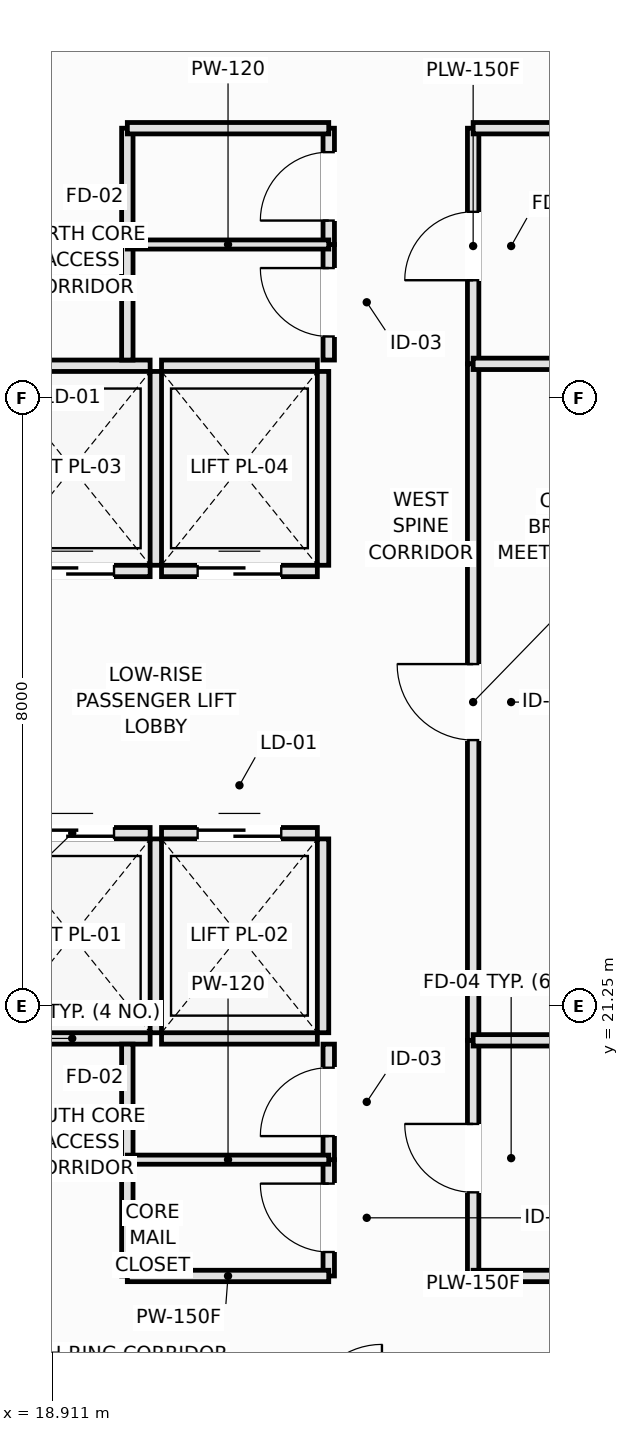
"""IFC4 building model, lengths in metres.
Left out: names, types, materials, properties, quantities, classifications, styles, units other than length and angle.
Written with IfcOpenShell. Run it as: python <this file> out.ifc"""

import sys

from ifc_helpers import new_model, si_unit, direction, frame, frame_2d, origin, place, context, subcontext, project, spatial, rectangle, extrude, element, fill, save


model = new_model("IFC4")
c1 = context("Model", 3, precision=1e-05, world=origin(), true_north=direction((0.0, 1.0)))
c2 = subcontext(c1, "Body", "Model", "MODEL_VIEW")
j1 = project(units=[si_unit("LENGTHUNIT", "METRE"), si_unit("PLANEANGLEUNIT", "RADIAN")], contexts=[c1])
p1 = place(None, origin())
s1 = spatial("IfcSite", under=j1, at=p1, CompositionType="ELEMENT")
p2 = place(p1, origin())
s2 = spatial("IfcBuilding", under=s1, at=p2, CompositionType="ELEMENT")
p3 = place(p2, frame((0.0, 0.0, 68.2)))
s3 = spatial("IfcBuildingStorey", under=s2, at=p3, CompositionType="ELEMENT", Elevation=68.2)
p4 = place(p3, frame((18.15, 20.825, 0.0), z_axis=(0.0, 0.0, 1.0), x_axis=(1.0, 0.0, 0.0)))
e1 = element("IfcWall", 1, at=p4, inside=s3, PredefinedType="PARTITIONING", context=c2, shape_type="SweptSolid", body=[
    extrude(rectangle(XDim=2.05, YDim=0.15, at=frame_2d((1.025, 0.0))), origin(), (0.0, 0.0, 1.0), 3.37),
])
p5 = place(p3, frame((18.15, 23.525, 0.0), z_axis=(0.0, 0.0, 1.0), x_axis=(1.0, 0.0, 0.0)))
e2 = element("IfcWall", 2, at=p5, inside=s3, PredefinedType="PARTITIONING", context=c2, shape_type="SweptSolid", body=[
    extrude(rectangle(XDim=2.05, YDim=0.15, at=frame_2d((1.025, 0.0))), origin(), (0.0, 0.0, 1.0), 3.37),
])
p6 = place(p5, frame((0.475, 0.0, 0.0)))
e3 = element("IfcOpeningElement", 3, at=p6, cuts=e2, PredefinedType="OPENING", context=c2, shape_type="SweptSolid", body=[
    extrude(rectangle(XDim=1.1, YDim=2.2, at=frame_2d((0.55, 1.1))), frame((0.0, 0.085, 0.0), z_axis=(0.0, -1.0, 0.0), x_axis=(1.0, 0.0, 0.0)), (0.0, 0.0, 1.0), 0.17),
])
p7 = place(p3, frame((20.275, 20.9, 0.0), z_axis=(0.0, 0.0, 1.0), x_axis=(0.0, 1.0, 0.0)))
e4 = element("IfcWall", 4, at=p7, inside=s3, PredefinedType="PARTITIONING", context=c2, shape_type="SweptSolid", body=[
    extrude(rectangle(XDim=2.55, YDim=0.15, at=frame_2d((1.275, 0.0))), origin(), (0.0, 0.0, 1.0), 3.37),
])
p8 = place(p3, frame((20.35, 20.825, 0.0), z_axis=(0.0, 0.0, 1.0), x_axis=(1.0, 0.0, 0.0)))
e5 = element("IfcWall", 5, at=p8, inside=s3, PredefinedType="PARTITIONING", context=c2, shape_type="SweptSolid", body=[
    extrude(rectangle(XDim=2.05, YDim=0.15, at=frame_2d((1.025, 0.0))), origin(), (0.0, 0.0, 1.0), 3.37),
])
p9 = place(p3, frame((20.35, 23.525, 0.0), z_axis=(0.0, 0.0, 1.0), x_axis=(1.0, 0.0, 0.0)))
e6 = element("IfcWall", 6, at=p9, inside=s3, PredefinedType="PARTITIONING", context=c2, shape_type="SweptSolid", body=[
    extrude(rectangle(XDim=2.05, YDim=0.15, at=frame_2d((1.025, 0.0))), origin(), (0.0, 0.0, 1.0), 3.37),
])
p10 = place(p9, frame((0.475, 0.0, 0.0)))
e7 = element("IfcOpeningElement", 7, at=p10, cuts=e6, PredefinedType="OPENING", context=c2, shape_type="SweptSolid", body=[
    extrude(rectangle(XDim=1.1, YDim=2.2, at=frame_2d((0.55, 1.1))), frame((0.0, 0.085, 0.0), z_axis=(0.0, -1.0, 0.0), x_axis=(1.0, 0.0, 0.0)), (0.0, 0.0, 1.0), 0.17),
])
p11 = place(p3, frame((22.475, 20.9, 0.0), z_axis=(0.0, 0.0, 1.0), x_axis=(0.0, 1.0, 0.0)))
e8 = element("IfcWall", 8, at=p11, inside=s3, PredefinedType="PARTITIONING", context=c2, shape_type="SweptSolid", body=[
    extrude(rectangle(XDim=2.55, YDim=0.15, at=frame_2d((1.275, 0.0))), origin(), (0.0, 0.0, 1.0), 3.37),
])
p12 = place(p3, frame((18.15, 26.975, 0.0), z_axis=(0.0, 0.0, 1.0), x_axis=(1.0, 0.0, 0.0)))
e9 = element("IfcWall", 9, at=p12, inside=s3, PredefinedType="PARTITIONING", context=c2, shape_type="SweptSolid", body=[
    extrude(rectangle(XDim=2.05, YDim=0.15, at=frame_2d((1.025, 0.0))), origin(), (0.0, 0.0, 1.0), 3.37),
])
p13 = place(p12, frame((0.475, 0.0, 0.0)))
e10 = element("IfcOpeningElement", 10, at=p13, cuts=e9, PredefinedType="OPENING", context=c2, shape_type="SweptSolid", body=[
    extrude(rectangle(XDim=1.1, YDim=2.2, at=frame_2d((0.55, 1.1))), frame((0.0, 0.085, 0.0), z_axis=(0.0, -1.0, 0.0), x_axis=(1.0, 0.0, 0.0)), (0.0, 0.0, 1.0), 0.17),
])
p14 = place(p3, frame((18.15, 29.675, 0.0), z_axis=(0.0, 0.0, 1.0), x_axis=(1.0, 0.0, 0.0)))
e11 = element("IfcWall", 11, at=p14, inside=s3, PredefinedType="PARTITIONING", context=c2, shape_type="SweptSolid", body=[
    extrude(rectangle(XDim=2.05, YDim=0.15, at=frame_2d((1.025, 0.0))), origin(), (0.0, 0.0, 1.0), 3.37),
])
p15 = place(p3, frame((20.275, 27.05, 0.0), z_axis=(0.0, 0.0, 1.0), x_axis=(0.0, 1.0, 0.0)))
e12 = element("IfcWall", 12, at=p15, inside=s3, PredefinedType="PARTITIONING", context=c2, shape_type="SweptSolid", body=[
    extrude(rectangle(XDim=2.55, YDim=0.15, at=frame_2d((1.275, 0.0))), origin(), (0.0, 0.0, 1.0), 3.37),
])
p16 = place(p3, frame((20.35, 26.975, 0.0), z_axis=(0.0, 0.0, 1.0), x_axis=(1.0, 0.0, 0.0)))
e13 = element("IfcWall", 13, at=p16, inside=s3, PredefinedType="PARTITIONING", context=c2, shape_type="SweptSolid", body=[
    extrude(rectangle(XDim=2.05, YDim=0.15, at=frame_2d((1.025, 0.0))), origin(), (0.0, 0.0, 1.0), 3.37),
])
p17 = place(p16, frame((0.475, 0.0, 0.0)))
e14 = element("IfcOpeningElement", 14, at=p17, cuts=e13, PredefinedType="OPENING", context=c2, shape_type="SweptSolid", body=[
    extrude(rectangle(XDim=1.1, YDim=2.2, at=frame_2d((0.55, 1.1))), frame((0.0, 0.085, 0.0), z_axis=(0.0, -1.0, 0.0), x_axis=(1.0, 0.0, 0.0)), (0.0, 0.0, 1.0), 0.17),
])
p18 = place(p3, frame((20.35, 29.675, 0.0), z_axis=(0.0, 0.0, 1.0), x_axis=(1.0, 0.0, 0.0)))
e15 = element("IfcWall", 15, at=p18, inside=s3, PredefinedType="PARTITIONING", context=c2, shape_type="SweptSolid", body=[
    extrude(rectangle(XDim=2.05, YDim=0.15, at=frame_2d((1.025, 0.0))), origin(), (0.0, 0.0, 1.0), 3.37),
])
p19 = place(p3, frame((22.475, 27.05, 0.0), z_axis=(0.0, 0.0, 1.0), x_axis=(0.0, 1.0, 0.0)))
e16 = element("IfcWall", 16, at=p19, inside=s3, PredefinedType="PARTITIONING", context=c2, shape_type="SweptSolid", body=[
    extrude(rectangle(XDim=2.55, YDim=0.15, at=frame_2d((1.275, 0.0))), origin(), (0.0, 0.0, 1.0), 3.37),
])
p20 = place(p3, frame((22.55, 17.7, 0.0), z_axis=(0.0, 0.0, 1.0), x_axis=(0.0, 1.0, 0.0)))
e17 = element("IfcWall", 17, at=p20, inside=s3, PredefinedType="PARTITIONING", context=c2, shape_type="SweptSolid", body=[
    extrude(rectangle(XDim=1.53, YDim=0.15, at=frame_2d((0.765, 0.0))), origin(), (0.0, 0.0, 1.0), 3.01),
])
p21 = place(p20, frame((0.315, 0.0, 0.0)))
e18 = element("IfcOpeningElement", 18, at=p21, cuts=e17, PredefinedType="OPENING", context=c2, shape_type="SweptSolid", body=[
    extrude(rectangle(XDim=0.9, YDim=2.1, at=frame_2d((0.45, 1.05))), frame((0.0, 0.085, 0.0), z_axis=(0.0, -1.0, 0.0), x_axis=(1.0, 0.0, 0.0)), (0.0, 0.0, 1.0), 0.17),
])
p22 = place(p3, frame((22.55, 19.23, 0.0), z_axis=(0.0, 0.0, 1.0), x_axis=(0.0, 1.0, 0.0)))
e19 = element("IfcWall", 19, at=p22, inside=s3, PredefinedType="PARTITIONING", context=c2, shape_type="SweptSolid", body=[
    extrude(rectangle(XDim=1.52, YDim=0.15, at=frame_2d((0.76, 0.0))), origin(), (0.0, 0.0, 1.0), 3.01),
])
p23 = place(p22, frame((0.31, 0.0, 0.0)))
e20 = element("IfcOpeningElement", 20, at=p23, cuts=e19, PredefinedType="OPENING", context=c2, shape_type="SweptSolid", body=[
    extrude(rectangle(XDim=0.9, YDim=2.1, at=frame_2d((0.45, 1.05))), frame((0.0, 0.085, 0.0), z_axis=(0.0, -1.0, 0.0), x_axis=(1.0, 0.0, 0.0)), (0.0, 0.0, 1.0), 0.17),
])
p24 = place(p3, frame((22.55, 29.75, 0.0), z_axis=(0.0, 0.0, 1.0), x_axis=(0.0, 1.0, 0.0)))
e21 = element("IfcWall", 21, at=p24, inside=s3, PredefinedType="PARTITIONING", context=c2, shape_type="SweptSolid", body=[
    extrude(rectangle(XDim=1.52, YDim=0.15, at=frame_2d((0.76, 0.0))), origin(), (0.0, 0.0, 1.0), 3.01),
])
p25 = place(p24, frame((0.31, 0.0, 0.0)))
e22 = element("IfcOpeningElement", 22, at=p25, cuts=e21, PredefinedType="OPENING", context=c2, shape_type="SweptSolid", body=[
    extrude(rectangle(XDim=0.9, YDim=2.1, at=frame_2d((0.45, 1.05))), frame((0.0, 0.085, 0.0), z_axis=(0.0, -1.0, 0.0), x_axis=(1.0, 0.0, 0.0)), (0.0, 0.0, 1.0), 0.17),
])
p26 = place(p3, frame((22.55, 31.27, 0.0), z_axis=(0.0, 0.0, 1.0), x_axis=(0.0, 1.0, 0.0)))
e23 = element("IfcWall", 23, at=p26, inside=s3, PredefinedType="PARTITIONING", context=c2, shape_type="SweptSolid", body=[
    extrude(rectangle(XDim=1.53, YDim=0.15, at=frame_2d((0.765, 0.0))), origin(), (0.0, 0.0, 1.0), 3.01),
])
p27 = place(p26, frame((0.315, 0.0, 0.0)))
e24 = element("IfcOpeningElement", 24, at=p27, cuts=e23, PredefinedType="OPENING", context=c2, shape_type="SweptSolid", body=[
    extrude(rectangle(XDim=0.9, YDim=2.1, at=frame_2d((0.45, 1.05))), frame((0.0, 0.085, 0.0), z_axis=(0.0, -1.0, 0.0), x_axis=(1.0, 0.0, 0.0)), (0.0, 0.0, 1.0), 0.17),
])
p28 = place(p3, frame((24.45, 17.7, 0.0), z_axis=(0.0, 0.0, 1.0), x_axis=(0.0, 1.0, 0.0)))
e25 = element("IfcWall", 25, at=p28, inside=s3, PredefinedType="PLUMBINGWALL", context=c2, shape_type="SweptSolid", body=[
    extrude(rectangle(XDim=3.1, YDim=0.15, at=frame_2d((1.55, 0.0))), origin(), (0.0, 0.0, 1.0), 3.37),
])
p29 = place(p28, frame((1.1, 0.0, 0.0)))
e26 = element("IfcOpeningElement", 26, at=p29, cuts=e25, PredefinedType="OPENING", context=c2, shape_type="SweptSolid", body=[
    extrude(rectangle(XDim=0.9, YDim=2.1, at=frame_2d((0.45, 1.05))), frame((0.0, 0.085, 0.0), z_axis=(0.0, -1.0, 0.0), x_axis=(1.0, 0.0, 0.0)), (0.0, 0.0, 1.0), 0.17),
])
p30 = place(p3, frame((24.45, 29.7, 0.0), z_axis=(0.0, 0.0, 1.0), x_axis=(0.0, 1.0, 0.0)))
e27 = element("IfcWall", 27, at=p30, inside=s3, PredefinedType="PLUMBINGWALL", context=c2, shape_type="SweptSolid", body=[
    extrude(rectangle(XDim=3.1, YDim=0.15, at=frame_2d((1.55, 0.0))), origin(), (0.0, 0.0, 1.0), 3.37),
])
p31 = place(p30, frame((1.1, 0.0, 0.0)))
e28 = element("IfcOpeningElement", 28, at=p31, cuts=e27, PredefinedType="OPENING", context=c2, shape_type="SweptSolid", body=[
    extrude(rectangle(XDim=0.9, YDim=2.1, at=frame_2d((0.45, 1.05))), frame((0.0, 0.085, 0.0), z_axis=(0.0, -1.0, 0.0), x_axis=(1.0, 0.0, 0.0)), (0.0, 0.0, 1.0), 0.17),
])
p32 = place(p3, frame((24.45, 20.8, 0.0), z_axis=(0.0, 0.0, 1.0), x_axis=(0.0, 1.0, 0.0)))
e29 = element("IfcWall", 29, at=p32, inside=s3, PredefinedType="PARTITIONING", context=c2, shape_type="SweptSolid", body=[
    extrude(rectangle(XDim=8.9, YDim=0.15, at=frame_2d((4.45, 0.0))), origin(), (0.0, 0.0, 1.0), 3.37),
])
p33 = place(p32, frame((3.95, 0.0, 0.0)))
e30 = element("IfcOpeningElement", 30, at=p33, cuts=e29, PredefinedType="OPENING", context=c2, shape_type="SweptSolid", body=[
    extrude(rectangle(XDim=1.0, YDim=2.15, at=frame_2d((0.5, 1.075))), frame((0.0, 0.085, 0.0), z_axis=(0.0, -1.0, 0.0), x_axis=(1.0, 0.0, 0.0)), (0.0, 0.0, 1.0), 0.17),
])
p34 = place(p3, frame((19.9, 17.7, 0.0), z_axis=(0.0, 0.0, 1.0), x_axis=(0.0, 1.0, 0.0)))
e31 = element("IfcWall", 31, at=p34, inside=s3, PredefinedType="PARTITIONING", context=c2, shape_type="SweptSolid", body=[
    extrude(rectangle(XDim=1.53, YDim=0.15, at=frame_2d((0.765, 0.0))), origin(), (0.0, 0.0, 1.0), 3.37),
])
for number, where, z_axis, x_axis in (
    (32, (19.9, 19.23, 0.0), (0.0, 0.0, 1.0), (0.0, 1.0, 0.0)),
    (33, (19.9, 29.75, 0.0), (0.0, 0.0, 1.0), (0.0, 1.0, 0.0)),
):
    element("IfcWall", number, at=place(p3, frame(where, z_axis=z_axis, x_axis=x_axis)), inside=s3, PredefinedType="PARTITIONING", context=c2, shape_type="SweptSolid", body=[
        extrude(rectangle(XDim=1.52, YDim=0.15, at=frame_2d((0.76, 0.0))), origin(), (0.0, 0.0, 1.0), 3.37),
    ])
p35 = place(p3, frame((19.9, 31.27, 0.0), z_axis=(0.0, 0.0, 1.0), x_axis=(0.0, 1.0, 0.0)))
e34 = element("IfcWall", 34, at=p35, inside=s3, PredefinedType="PARTITIONING", context=c2, shape_type="SweptSolid", body=[
    extrude(rectangle(XDim=1.53, YDim=0.15, at=frame_2d((0.765, 0.0))), origin(), (0.0, 0.0, 1.0), 3.37),
])
p36 = place(p3, frame((19.9, 17.7, 0.0), z_axis=(0.0, 0.0, 1.0), x_axis=(1.0, 0.0, 0.0)))
e35 = element("IfcWall", 35, at=p36, inside=s3, PredefinedType="PARTITIONING", context=c2, shape_type="SweptSolid", body=[
    extrude(rectangle(XDim=2.65, YDim=0.15, at=frame_2d((1.325, 0.0))), origin(), (0.0, 0.0, 1.0), 3.37),
])
p37 = place(p3, frame((24.45, 17.7, 0.0), z_axis=(0.0, 0.0, 1.0), x_axis=(1.0, 0.0, 0.0)))
e36 = element("IfcWall", 36, at=p37, inside=s3, PredefinedType="PLUMBINGWALL", context=c2, shape_type="SweptSolid", body=[
    extrude(rectangle(XDim=3.15, YDim=0.15, at=frame_2d((1.575, 0.0))), origin(), (0.0, 0.0, 1.0), 3.37),
])
p38 = place(p3, frame((19.9, 32.8, 0.0), z_axis=(0.0, 0.0, 1.0), x_axis=(1.0, 0.0, 0.0)))
e37 = element("IfcWall", 37, at=p38, inside=s3, PredefinedType="PARTITIONING", context=c2, shape_type="SweptSolid", body=[
    extrude(rectangle(XDim=2.65, YDim=0.15, at=frame_2d((1.325, 0.0))), origin(), (0.0, 0.0, 1.0), 3.37),
])
p39 = place(p3, frame((24.45, 32.8, 0.0), z_axis=(0.0, 0.0, 1.0), x_axis=(1.0, 0.0, 0.0)))
e38 = element("IfcWall", 38, at=p39, inside=s3, PredefinedType="PLUMBINGWALL", context=c2, shape_type="SweptSolid", body=[
    extrude(rectangle(XDim=3.15, YDim=0.15, at=frame_2d((1.575, 0.0))), origin(), (0.0, 0.0, 1.0), 3.37),
])
for number, where, z_axis, x_axis in (
    (39, (19.9, 19.23, 0.0), (0.0, 0.0, 1.0), (1.0, 0.0, 0.0)),
    (40, (19.9, 31.27, 0.0), (0.0, 0.0, 1.0), (1.0, 0.0, 0.0)),
):
    element("IfcWall", number, at=place(p3, frame(where, z_axis=z_axis, x_axis=x_axis)), inside=s3, PredefinedType="PARTITIONING", context=c2, shape_type="SweptSolid", body=[
        extrude(rectangle(XDim=2.65, YDim=0.12, at=frame_2d((1.325, 0.0))), origin(), (0.0, 0.0, 1.0), 3.37),
    ])
for number, where, z_axis, x_axis in (
    (41, (24.45, 20.8, 0.0), (0.0, 0.0, 1.0), (1.0, 0.0, 0.0)),
    (42, (24.45, 29.7, 0.0), (0.0, 0.0, 1.0), (1.0, 0.0, 0.0)),
):
    element("IfcWall", number, at=place(p3, frame(where, z_axis=z_axis, x_axis=x_axis)), inside=s3, PredefinedType="PLUMBINGWALL", context=c2, shape_type="SweptSolid", body=[
        extrude(rectangle(XDim=3.05, YDim=0.15, at=frame_2d((1.525, 0.0))), origin(), (0.0, 0.0, 1.0), 3.37),
    ])
p40 = place(p6, origin())
e43 = element("IfcDoor", 43, at=p40, inside=s3, OperationType="DOUBLE_DOOR_SLIDING", PredefinedType="DOOR", context=c2, shape_type="SweptSolid", body=[
    extrude(rectangle(XDim=1.1, YDim=2.2, at=frame_2d((0.55, 1.1))), frame((0.0, 0.025, 0.0), z_axis=(0.0, -1.0, 0.0), x_axis=(1.0, 0.0, 0.0)), (0.0, 0.0, 1.0), 0.05),
])
fill(e3, e43)
p41 = place(p10, origin())
e44 = element("IfcDoor", 44, at=p41, inside=s3, OperationType="DOUBLE_DOOR_SLIDING", PredefinedType="DOOR", context=c2, shape_type="SweptSolid", body=[
    extrude(rectangle(XDim=1.1, YDim=2.2, at=frame_2d((0.55, 1.1))), frame((0.0, 0.025, 0.0), z_axis=(0.0, -1.0, 0.0), x_axis=(1.0, 0.0, 0.0)), (0.0, 0.0, 1.0), 0.05),
])
fill(e7, e44)
p42 = place(p13, origin())
e45 = element("IfcDoor", 45, at=p42, inside=s3, OperationType="DOUBLE_DOOR_SLIDING", PredefinedType="DOOR", context=c2, shape_type="SweptSolid", body=[
    extrude(rectangle(XDim=1.1, YDim=2.2, at=frame_2d((0.55, 1.1))), frame((0.0, 0.025, 0.0), z_axis=(0.0, -1.0, 0.0), x_axis=(1.0, 0.0, 0.0)), (0.0, 0.0, 1.0), 0.05),
])
fill(e10, e45)
p43 = place(p17, origin())
e46 = element("IfcDoor", 46, at=p43, inside=s3, OperationType="DOUBLE_DOOR_SLIDING", PredefinedType="DOOR", context=c2, shape_type="SweptSolid", body=[
    extrude(rectangle(XDim=1.1, YDim=2.2, at=frame_2d((0.55, 1.1))), frame((0.0, 0.025, 0.0), z_axis=(0.0, -1.0, 0.0), x_axis=(1.0, 0.0, 0.0)), (0.0, 0.0, 1.0), 0.05),
])
fill(e14, e46)
p44 = place(p21, origin())
e47 = element("IfcDoor", 47, at=p44, inside=s3, OperationType="SINGLE_SWING_RIGHT", PredefinedType="DOOR", context=c2, shape_type="SweptSolid", body=[
    extrude(rectangle(XDim=0.9, YDim=2.1, at=frame_2d((0.45, 1.05))), frame((0.0, 0.025, 0.0), z_axis=(0.0, -1.0, 0.0), x_axis=(1.0, 0.0, 0.0)), (0.0, 0.0, 1.0), 0.05),
])
fill(e18, e47)
p45 = place(p23, origin())
e48 = element("IfcDoor", 48, at=p45, inside=s3, OperationType="SINGLE_SWING_LEFT", PredefinedType="DOOR", context=c2, shape_type="SweptSolid", body=[
    extrude(rectangle(XDim=0.9, YDim=2.1, at=frame_2d((0.45, 1.05))), frame((0.0, 0.025, 0.0), z_axis=(0.0, -1.0, 0.0), x_axis=(1.0, 0.0, 0.0)), (0.0, 0.0, 1.0), 0.05),
])
fill(e20, e48)
p46 = place(p25, origin())
e49 = element("IfcDoor", 49, at=p46, inside=s3, OperationType="SINGLE_SWING_RIGHT", PredefinedType="DOOR", context=c2, shape_type="SweptSolid", body=[
    extrude(rectangle(XDim=0.9, YDim=2.1, at=frame_2d((0.45, 1.05))), frame((0.0, 0.025, 0.0), z_axis=(0.0, -1.0, 0.0), x_axis=(1.0, 0.0, 0.0)), (0.0, 0.0, 1.0), 0.05),
])
fill(e22, e49)
p47 = place(p27, origin())
e50 = element("IfcDoor", 50, at=p47, inside=s3, OperationType="SINGLE_SWING_LEFT", PredefinedType="DOOR", context=c2, shape_type="SweptSolid", body=[
    extrude(rectangle(XDim=0.9, YDim=2.1, at=frame_2d((0.45, 1.05))), frame((0.0, 0.025, 0.0), z_axis=(0.0, -1.0, 0.0), x_axis=(1.0, 0.0, 0.0)), (0.0, 0.0, 1.0), 0.05),
])
fill(e24, e50)
p48 = place(p29, origin())
e51 = element("IfcDoor", 51, at=p48, inside=s3, OperationType="SINGLE_SWING_RIGHT", PredefinedType="DOOR", context=c2, shape_type="SweptSolid", body=[
    extrude(rectangle(XDim=0.9, YDim=2.1, at=frame_2d((0.45, 1.05))), frame((0.0, 0.025, 0.0), z_axis=(0.0, -1.0, 0.0), x_axis=(1.0, 0.0, 0.0)), (0.0, 0.0, 1.0), 0.05),
])
fill(e26, e51)
p49 = place(p31, origin())
e52 = element("IfcDoor", 52, at=p49, inside=s3, OperationType="SINGLE_SWING_LEFT", PredefinedType="DOOR", context=c2, shape_type="SweptSolid", body=[
    extrude(rectangle(XDim=0.9, YDim=2.1, at=frame_2d((0.45, 1.05))), frame((0.0, 0.025, 0.0), z_axis=(0.0, -1.0, 0.0), x_axis=(1.0, 0.0, 0.0)), (0.0, 0.0, 1.0), 0.05),
])
fill(e28, e52)
p50 = place(p33, origin())
e53 = element("IfcDoor", 53, at=p50, inside=s3, OperationType="SINGLE_SWING_RIGHT", PredefinedType="DOOR", context=c2, shape_type="SweptSolid", body=[
    extrude(rectangle(XDim=1.0, YDim=2.15, at=frame_2d((0.5, 1.075))), frame((0.0, 0.025, 0.0), z_axis=(0.0, -1.0, 0.0), x_axis=(1.0, 0.0, 0.0)), (0.0, 0.0, 1.0), 0.05),
])
fill(e30, e53)
save(model, sys.argv[1])
